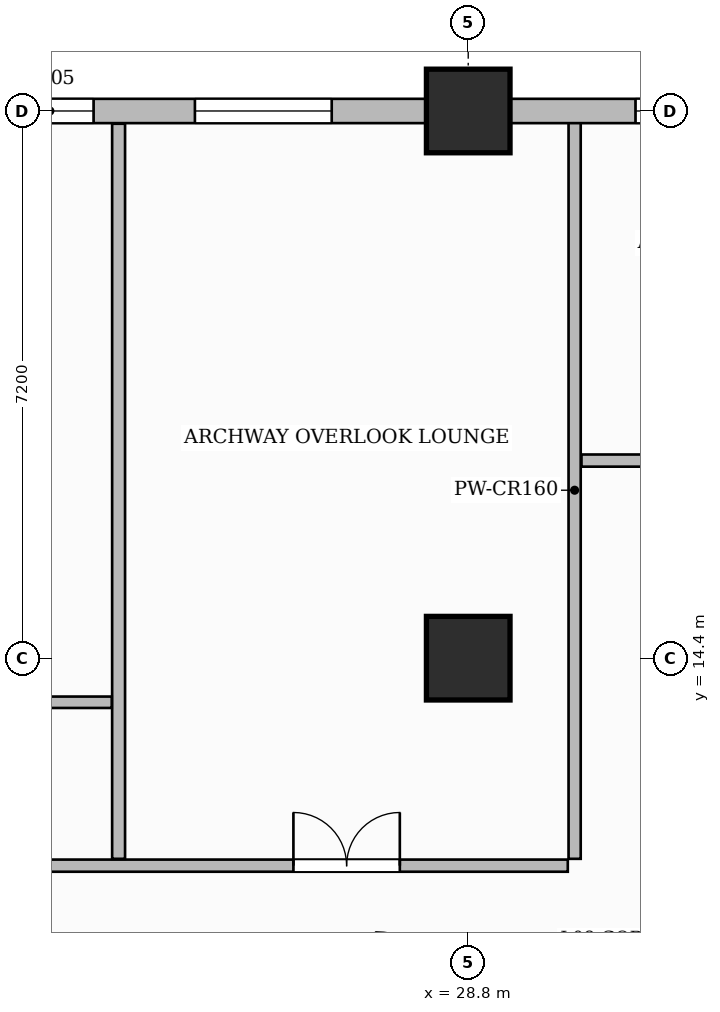
"""IFC4 building model, lengths in metres.
Left out: names, types, materials, properties, quantities, classifications, styles, units other than length and angle.
Written with IfcOpenShell. Run it as: python <this file> out.ifc"""

import sys

from ifc_helpers import new_model, si_unit, direction, frame, frame_2d, origin, origin_2d, place, context, subcontext, project, spatial, rectangle, extrude, source, transform, mapped, element, fill, save


model = new_model("IFC4")
c1 = context("Model", 3, precision=1e-05, world=origin(), true_north=direction((0.0, 1.0)))
c2 = subcontext(c1, "Body", "Model", "MODEL_VIEW")
j1 = project(units=[si_unit("LENGTHUNIT", "METRE"), si_unit("PLANEANGLEUNIT", "RADIAN")], contexts=[c1])
p1 = place(None, origin())
s1 = spatial("IfcSite", under=j1, at=p1, CompositionType="ELEMENT")
p2 = place(p1, origin())
s2 = spatial("IfcBuilding", under=s1, at=p2, CompositionType="ELEMENT")
p3 = place(p2, frame((0.0, 0.0, 39.8)))
s3 = spatial("IfcBuildingStorey", under=s2, at=p3, CompositionType="ELEMENT", Elevation=39.8)
m1 = source(origin(), c2, "Body", "SweptSolid", [
    extrude(rectangle(XDim=1.1, YDim=1.1, at=origin_2d()), origin(), (0.0, 0.0, 1.0), 3.7),
])
for number, where, z_axis, x_axis in (
    (1, (28.8, 14.4, 0.0), (0.0, 0.0, 1.0), (1.0, 0.0, 0.0)),
    (2, (28.8, 21.6, 0.0), (0.0, 0.0, 1.0), (1.0, 0.0, 0.0)),
):
    element("IfcColumn", number, at=place(p3, frame(where, z_axis=z_axis, x_axis=x_axis)), inside=s3, PredefinedType="COLUMN", context=c2, shape_type="MappedRepresentation", body=[
        mapped(m1, transform((0.0, 0.0, 0.0), scale=1.0)),
    ])
p4 = place(p3, frame((14.568, 11.67, 0.0), z_axis=(0.0, 0.0, 1.0), x_axis=(1.0, 0.0, 0.0)))
e3 = element("IfcWall", 3, at=p4, inside=s3, PredefinedType="PARTITIONING", context=c2, shape_type="SweptSolid", body=[
    extrude(rectangle(XDim=15.542, YDim=0.16, at=frame_2d((7.771, 0.0))), origin(), (0.0, 0.0, 1.0), 3.45),
])
p5 = place(p4, frame((3.062, 0.0, 0.0)))
e4 = element("IfcOpeningElement", 4, at=p5, cuts=e3, PredefinedType="OPENING", context=c2, shape_type="SweptSolid", body=[
    extrude(rectangle(XDim=1.05, YDim=2.25, at=frame_2d((0.525, 1.125))), frame((0.0, 0.09, 0.0), z_axis=(0.0, -1.0, 0.0), x_axis=(1.0, 0.0, 0.0)), (0.0, 0.0, 1.0), 0.18),
])
p6 = place(p4, frame((11.932, 0.0, 0.0)))
e5 = element("IfcOpeningElement", 5, at=p6, cuts=e3, PredefinedType="OPENING", context=c2, shape_type="SweptSolid", body=[
    extrude(rectangle(XDim=1.4, YDim=2.35, at=frame_2d((0.7, 1.175))), frame((0.0, 0.09, 0.0), z_axis=(0.0, -1.0, 0.0), x_axis=(1.0, 0.0, 0.0)), (0.0, 0.0, 1.0), 0.18),
])
p7 = place(p3, frame((30.2, 11.76, 0.0), z_axis=(0.0, 0.0, 1.0), x_axis=(0.0, 1.0, 0.0)))
e6 = element("IfcWall", 6, at=p7, inside=s3, PredefinedType="PARTITIONING", context=c2, shape_type="SweptSolid", body=[
    extrude(rectangle(XDim=9.7, YDim=0.16, at=frame_2d((4.85, 0.0))), origin(), (0.0, 0.0, 1.0), 3.45),
])
p8 = place(p3, frame((30.29, 17.0, 0.0), z_axis=(0.0, 0.0, 1.0), x_axis=(1.0, 0.0, 0.0)))
e7 = element("IfcWall", 7, at=p8, inside=s3, PredefinedType="PARTITIONING", context=c2, shape_type="SweptSolid", body=[
    extrude(rectangle(XDim=19.37, YDim=0.16, at=frame_2d((9.685, 0.0))), origin(), (0.0, 0.0, 1.0), 3.45),
])
p9 = place(p8, frame((1.185, 0.0, 0.0)))
e8 = element("IfcOpeningElement", 8, at=p9, cuts=e7, PredefinedType="OPENING", context=c2, shape_type="SweptSolid", body=[
    extrude(rectangle(XDim=0.85, YDim=2.1, at=frame_2d((0.425, 1.05))), frame((0.0, 0.09, 0.0), z_axis=(0.0, -1.0, 0.0), x_axis=(1.0, 0.0, 0.0)), (0.0, 0.0, 1.0), 0.18),
])
p10 = place(p8, frame((6.66, 0.0, 0.0)))
e9 = element("IfcOpeningElement", 9, at=p10, cuts=e7, PredefinedType="OPENING", context=c2, shape_type="SweptSolid", body=[
    extrude(rectangle(XDim=0.9, YDim=2.15, at=frame_2d((0.45, 1.075))), frame((0.0, 0.09, 0.0), z_axis=(0.0, -1.0, 0.0), x_axis=(1.0, 0.0, 0.0)), (0.0, 0.0, 1.0), 0.18),
])
p11 = place(p8, frame((14.46, 0.0, 0.0)))
e10 = element("IfcOpeningElement", 10, at=p11, cuts=e7, PredefinedType="OPENING", context=c2, shape_type="SweptSolid", body=[
    extrude(rectangle(XDim=1.4, YDim=2.35, at=frame_2d((0.7, 1.175))), frame((0.0, 0.09, 0.0), z_axis=(0.0, -1.0, 0.0), x_axis=(1.0, 0.0, 0.0)), (0.0, 0.0, 1.0), 0.18),
])
p12 = place(p3, frame((24.2, 11.76, 0.0), z_axis=(0.0, 0.0, 1.0), x_axis=(0.0, 1.0, 0.0)))
e11 = element("IfcWall", 11, at=p12, inside=s3, PredefinedType="PARTITIONING", context=c2, shape_type="SweptSolid", body=[
    extrude(rectangle(XDim=9.672, YDim=0.17, at=frame_2d((4.836, 0.0))), origin(), (0.0, 0.0, 1.0), 3.45),
])
p13 = place(p3, frame((19.57, 13.82, 0.0), z_axis=(0.0, 0.0, 1.0), x_axis=(1.0, 0.0, 0.0)))
e12 = element("IfcWall", 12, at=p13, inside=s3, PredefinedType="PARTITIONING", context=c2, shape_type="SweptSolid", body=[
    extrude(rectangle(XDim=4.54, YDim=0.15, at=frame_2d((2.27, 0.0))), origin(), (0.0, 0.0, 1.0), 3.45),
])
p14 = place(p13, frame((2.788, 0.0, 0.0)))
e13 = element("IfcOpeningElement", 13, at=p14, cuts=e12, PredefinedType="OPENING", context=c2, shape_type="SweptSolid", body=[
    extrude(rectangle(XDim=0.9, YDim=2.15, at=frame_2d((0.45, 1.075))), frame((0.0, 0.085, 0.0), z_axis=(0.0, -1.0, 0.0), x_axis=(1.0, 0.0, 0.0)), (0.0, 0.0, 1.0), 0.17),
])
p15 = place(p3, frame((14.4, 21.6, 0.0), z_axis=(0.0, 0.0, 1.0), x_axis=(1.0, 0.0, 0.0)))
e14 = element("IfcWall", 14, at=p15, inside=s3, PredefinedType="SOLIDWALL", context=c2, shape_type="SweptSolid", body=[
    extrude(rectangle(XDim=43.2, YDim=0.32, at=frame_2d((21.6, 0.0))), origin(), (0.0, 0.0, 1.0), 2.885),
])
p16 = place(p15, frame((1.5, 0.0, 0.0)))
e15 = element("IfcOpeningElement", 15, at=p16, cuts=e14, PredefinedType="OPENING", context=c2, shape_type="SweptSolid", body=[
    extrude(rectangle(XDim=1.2, YDim=2.2, at=frame_2d((0.6, 1.1))), frame((0.0, 0.17, 0.0), z_axis=(0.0, -1.0, 0.0), x_axis=(1.0, 0.0, 0.0)), (0.0, 0.0, 1.0), 0.34),
])
p17 = place(p15, frame((3.336, 0.0, 0.8)))
e16 = element("IfcOpeningElement", 16, at=p17, cuts=e14, PredefinedType="OPENING", context=c2, shape_type="SweptSolid", body=[
    extrude(rectangle(XDim=1.4, YDim=1.85, at=frame_2d((0.7, 0.925))), frame((0.0, 0.17, 0.0), z_axis=(0.0, -1.0, 0.0), x_axis=(1.0, 0.0, 0.0)), (0.0, 0.0, 1.0), 0.34),
])
p18 = place(p15, frame((5.269, 0.0, 0.8)))
e17 = element("IfcOpeningElement", 17, at=p18, cuts=e14, PredefinedType="OPENING", context=c2, shape_type="SweptSolid", body=[
    extrude(rectangle(XDim=0.95, YDim=1.75, at=frame_2d((0.475, 0.875))), frame((0.0, 0.17, 0.0), z_axis=(0.0, -1.0, 0.0), x_axis=(1.0, 0.0, 0.0)), (0.0, 0.0, 1.0), 0.34),
])
p19 = place(p15, frame((8.321, 0.0, 0.8)))
e18 = element("IfcOpeningElement", 18, at=p19, cuts=e14, PredefinedType="OPENING", context=c2, shape_type="SweptSolid", body=[
    extrude(rectangle(XDim=1.15, YDim=1.8, at=frame_2d((0.575, 0.9))), frame((0.0, 0.17, 0.0), z_axis=(0.0, -1.0, 0.0), x_axis=(1.0, 0.0, 0.0)), (0.0, 0.0, 1.0), 0.34),
])
p20 = place(p15, frame((10.804, 0.0, 0.8)))
e19 = element("IfcOpeningElement", 19, at=p20, cuts=e14, PredefinedType="OPENING", context=c2, shape_type="SweptSolid", body=[
    extrude(rectangle(XDim=1.8, YDim=1.85, at=frame_2d((0.9, 0.925))), frame((0.0, 0.17, 0.0), z_axis=(0.0, -1.0, 0.0), x_axis=(1.0, 0.0, 0.0)), (0.0, 0.0, 1.0), 0.34),
])
p21 = place(p15, frame((16.601, 0.0, 0.8)))
e20 = element("IfcOpeningElement", 20, at=p21, cuts=e14, PredefinedType="OPENING", context=c2, shape_type="SweptSolid", body=[
    extrude(rectangle(XDim=1.8, YDim=1.85, at=frame_2d((0.9, 0.925))), frame((0.0, 0.17, 0.0), z_axis=(0.0, -1.0, 0.0), x_axis=(1.0, 0.0, 0.0)), (0.0, 0.0, 1.0), 0.34),
])
p22 = place(p15, frame((21.723, 0.0, 0.8)))
e21 = element("IfcOpeningElement", 21, at=p22, cuts=e14, PredefinedType="OPENING", context=c2, shape_type="SweptSolid", body=[
    extrude(rectangle(XDim=1.8, YDim=1.85, at=frame_2d((0.9, 0.925))), frame((0.0, 0.17, 0.0), z_axis=(0.0, -1.0, 0.0), x_axis=(1.0, 0.0, 0.0)), (0.0, 0.0, 1.0), 0.34),
])
p23 = place(p15, frame((24.469, 0.0, 0.8)))
e22 = element("IfcOpeningElement", 22, at=p23, cuts=e14, PredefinedType="OPENING", context=c2, shape_type="SweptSolid", body=[
    extrude(rectangle(XDim=1.8, YDim=1.85, at=frame_2d((0.9, 0.925))), frame((0.0, 0.17, 0.0), z_axis=(0.0, -1.0, 0.0), x_axis=(1.0, 0.0, 0.0)), (0.0, 0.0, 1.0), 0.34),
])
p24 = place(p15, frame((29.075, 0.0, 0.8)))
e23 = element("IfcOpeningElement", 23, at=p24, cuts=e14, PredefinedType="OPENING", context=c2, shape_type="SweptSolid", body=[
    extrude(rectangle(XDim=1.8, YDim=1.85, at=frame_2d((0.9, 0.925))), frame((0.0, 0.17, 0.0), z_axis=(0.0, -1.0, 0.0), x_axis=(1.0, 0.0, 0.0)), (0.0, 0.0, 1.0), 0.34),
])
p25 = place(p15, frame((32.125, 0.0, 0.8)))
e24 = element("IfcOpeningElement", 24, at=p25, cuts=e14, PredefinedType="OPENING", context=c2, shape_type="SweptSolid", body=[
    extrude(rectangle(XDim=1.8, YDim=1.85, at=frame_2d((0.9, 0.925))), frame((0.0, 0.17, 0.0), z_axis=(0.0, -1.0, 0.0), x_axis=(1.0, 0.0, 0.0)), (0.0, 0.0, 1.0), 0.34),
])
p26 = place(p15, frame((36.875, 0.0, 0.8)))
e25 = element("IfcOpeningElement", 25, at=p26, cuts=e14, PredefinedType="OPENING", context=c2, shape_type="SweptSolid", body=[
    extrude(rectangle(XDim=1.8, YDim=1.85, at=frame_2d((0.9, 0.925))), frame((0.0, 0.17, 0.0), z_axis=(0.0, -1.0, 0.0), x_axis=(1.0, 0.0, 0.0)), (0.0, 0.0, 1.0), 0.34),
])
p27 = place(p15, frame((39.925, 0.0, 0.8)))
e26 = element("IfcOpeningElement", 26, at=p27, cuts=e14, PredefinedType="OPENING", context=c2, shape_type="SweptSolid", body=[
    extrude(rectangle(XDim=1.8, YDim=1.85, at=frame_2d((0.9, 0.925))), frame((0.0, 0.17, 0.0), z_axis=(0.0, -1.0, 0.0), x_axis=(1.0, 0.0, 0.0)), (0.0, 0.0, 1.0), 0.34),
])
m2 = source(origin(), c2, "Body", "SweptSolid", [
    extrude(rectangle(XDim=1.4, YDim=2.35, at=frame_2d((0.7, 1.175))), frame((0.0, 0.025, 0.0), z_axis=(0.0, -1.0, 0.0), x_axis=(1.0, 0.0, 0.0)), (0.0, 0.0, 1.0), 0.05),
])
p28 = place(p6, origin())
e27 = element("IfcDoor", 27, at=p28, inside=s3, OperationType="DOUBLE_DOOR_SINGLE_SWING", PredefinedType="DOOR", context=c2, shape_type="MappedRepresentation", body=[
    mapped(m2, transform((0.0, 0.0, 0.0), scale=1.0)),
])
fill(e5, e27)
m3 = source(origin(), c2, "Body", "SweptSolid", [
    extrude(rectangle(XDim=1.15, YDim=1.8, at=frame_2d((0.575, 0.9))), frame((0.0, 0.03, 0.0), z_axis=(0.0, -1.0, 0.0), x_axis=(1.0, 0.0, 0.0)), (0.0, 0.0, 1.0), 0.06),
])
p29 = place(p19, origin())
e28 = element("IfcWindow", 28, at=p29, inside=s3, PartitioningType="SINGLE_PANEL", PredefinedType="WINDOW", context=c2, shape_type="MappedRepresentation", body=[
    mapped(m3, transform((0.0, 0.0, 0.0), scale=1.0)),
])
fill(e18, e28)
m4 = source(origin(), c2, "Body", "SweptSolid", [
    extrude(rectangle(XDim=1.8, YDim=1.85, at=frame_2d((0.9, 0.925))), frame((0.0, 0.03, 0.0), z_axis=(0.0, -1.0, 0.0), x_axis=(1.0, 0.0, 0.0)), (0.0, 0.0, 1.0), 0.06),
])
p30 = place(p20, origin())
e29 = element("IfcWindow", 29, at=p30, inside=s3, PartitioningType="DOUBLE_PANEL_VERTICAL", PredefinedType="WINDOW", context=c2, shape_type="MappedRepresentation", body=[
    mapped(m4, transform((0.0, 0.0, 0.0), scale=1.0)),
])
fill(e19, e29)
p31 = place(p21, origin())
e30 = element("IfcWindow", 30, at=p31, inside=s3, PartitioningType="DOUBLE_PANEL_VERTICAL", PredefinedType="WINDOW", context=c2, shape_type="MappedRepresentation", body=[
    mapped(m4, transform((0.0, 0.0, 0.0), scale=1.0)),
])
fill(e20, e30)
save(model, sys.argv[1])
